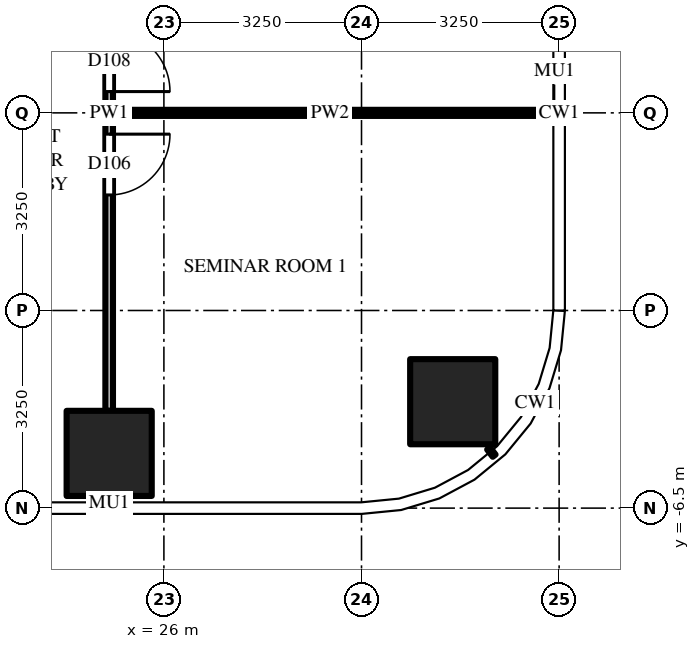
"""IFC4 building model, lengths in metres.
Left out: names, types, materials, properties, quantities, classifications, styles, units other than length and angle.
Written with IfcOpenShell. Run it as: python <this file> out.ifc"""

import sys

from ifc_helpers import new_model, si_unit, direction, frame, frame_2d, origin, origin_2d, place, context, subcontext, project, spatial, rectangle, extrude, source, transform, mapped, element, fill, save


model = new_model("IFC4")
c1 = context("Model", 3, precision=1e-05, world=origin(), true_north=direction((0.0, 1.0)))
c2 = subcontext(c1, "Body", "Model", "MODEL_VIEW")
j1 = project(units=[si_unit("LENGTHUNIT", "METRE"), si_unit("PLANEANGLEUNIT", "RADIAN")], contexts=[c1])
p1 = place(None, origin())
s1 = spatial("IfcSite", under=j1, at=p1, CompositionType="ELEMENT")
p2 = place(p1, origin())
s2 = spatial("IfcBuilding", under=s1, at=p2, CompositionType="ELEMENT")
p3 = place(p2, frame((0.0, 0.0, 65.5)))
s3 = spatial("IfcBuildingStorey", under=s2, at=p3, CompositionType="ELEMENT", Elevation=65.5)
m1 = source(origin(), c2, "Body", "SweptSolid", [
    extrude(rectangle(XDim=1.4, YDim=1.4, at=origin_2d()), origin(), (0.0, 0.0, 1.0), 4.5),
])
for number, where, z_axis, x_axis in (
    (1, (25.1, -5.6, 0.0), (0.0, 0.0, 1.0), (1.0, 0.0, 0.0)),
    (2, (30.75, -4.75, 0.0), (0.0, 0.0, 1.0), (1.0, 0.0, 0.0)),
):
    element("IfcColumn", number, at=place(p3, frame(where, z_axis=z_axis, x_axis=x_axis)), inside=s3, PredefinedType="COLUMN", context=c2, shape_type="MappedRepresentation", body=[
        mapped(m1, transform((0.0, 0.0, 0.0))),
    ])
m2 = source(origin(), c2, "Body", "SweptSolid", [
    extrude(rectangle(XDim=9.8, YDim=0.125, at=frame_2d((4.9, 0.0))), origin(), (0.0, 0.0, 1.0), 3.468),
])
p4 = place(p3, frame((25.1, 4.9, 0.0), z_axis=(0.0, 0.0, 1.0), x_axis=(0.0, -1.0, 0.0)))
e3 = element("IfcWall", 3, at=p4, inside=s3, PredefinedType="PARTITIONING", context=c2, shape_type="MappedRepresentation", body=[
    mapped(m2, transform((0.0, 0.0, 0.0))),
])
m3 = source(origin(), c2, "Body", "SweptSolid", [
    extrude(rectangle(XDim=1.0, YDim=2.1, at=frame_2d((0.5, 1.05))), frame((0.0, 0.073, 0.0), z_axis=(0.0, -1.0, 0.0), x_axis=(1.0, 0.0, 0.0)), (0.0, 0.0, 1.0), 0.145),
])
p5 = place(p4, frame((5.25, 0.0, 0.0)))
e4 = element("IfcOpeningElement", 4, at=p5, cuts=e3, PredefinedType="OPENING", context=c2, shape_type="MappedRepresentation", body=[
    mapped(m3, transform((0.0, 0.0, 0.0))),
])
p6 = place(p4, frame((3.55, 0.0, 0.0)))
e5 = element("IfcOpeningElement", 5, at=p6, cuts=e3, PredefinedType="OPENING", context=c2, shape_type="MappedRepresentation", body=[
    mapped(m3, transform((0.0, 0.0, 0.0))),
])
m4 = source(origin(), c2, "Body", "SweptSolid", [
    extrude(rectangle(XDim=7.137, YDim=0.1, at=frame_2d((3.569, 0.0))), origin(), (0.0, 0.0, 1.0), 3.33),
])
p7 = place(p3, frame((25.163, 0.0, 0.0), z_axis=(0.0, 0.0, 1.0), x_axis=(1.0, 0.0, 0.0)))
e6 = element("IfcWall", 6, at=p7, inside=s3, PredefinedType="PARTITIONING", context=c2, shape_type="MappedRepresentation", body=[
    mapped(m4, transform((0.0, 0.0, 0.0))),
])
m5 = source(origin(), c2, "Body", "SweptSolid", [
    extrude(rectangle(XDim=1.0, YDim=2.1, at=frame_2d((0.5, 1.05))), frame((0.0, 0.025, 0.0), z_axis=(0.0, -1.0, 0.0), x_axis=(1.0, 0.0, 0.0)), (0.0, 0.0, 1.0), 0.05),
])
p8 = place(p5, origin())
e7 = element("IfcDoor", 7, at=p8, inside=s3, OperationType="SINGLE_SWING_LEFT", PredefinedType="DOOR", context=c2, shape_type="MappedRepresentation", body=[
    mapped(m5, transform((0.0, 0.0, 0.0))),
])
fill(e4, e7)
p9 = place(p6, origin())
e8 = element("IfcDoor", 8, at=p9, inside=s3, OperationType="SINGLE_SWING_RIGHT", PredefinedType="DOOR", context=c2, shape_type="MappedRepresentation", body=[
    mapped(m5, transform((0.0, 0.0, 0.0))),
])
fill(e5, e8)
save(model, sys.argv[1])
